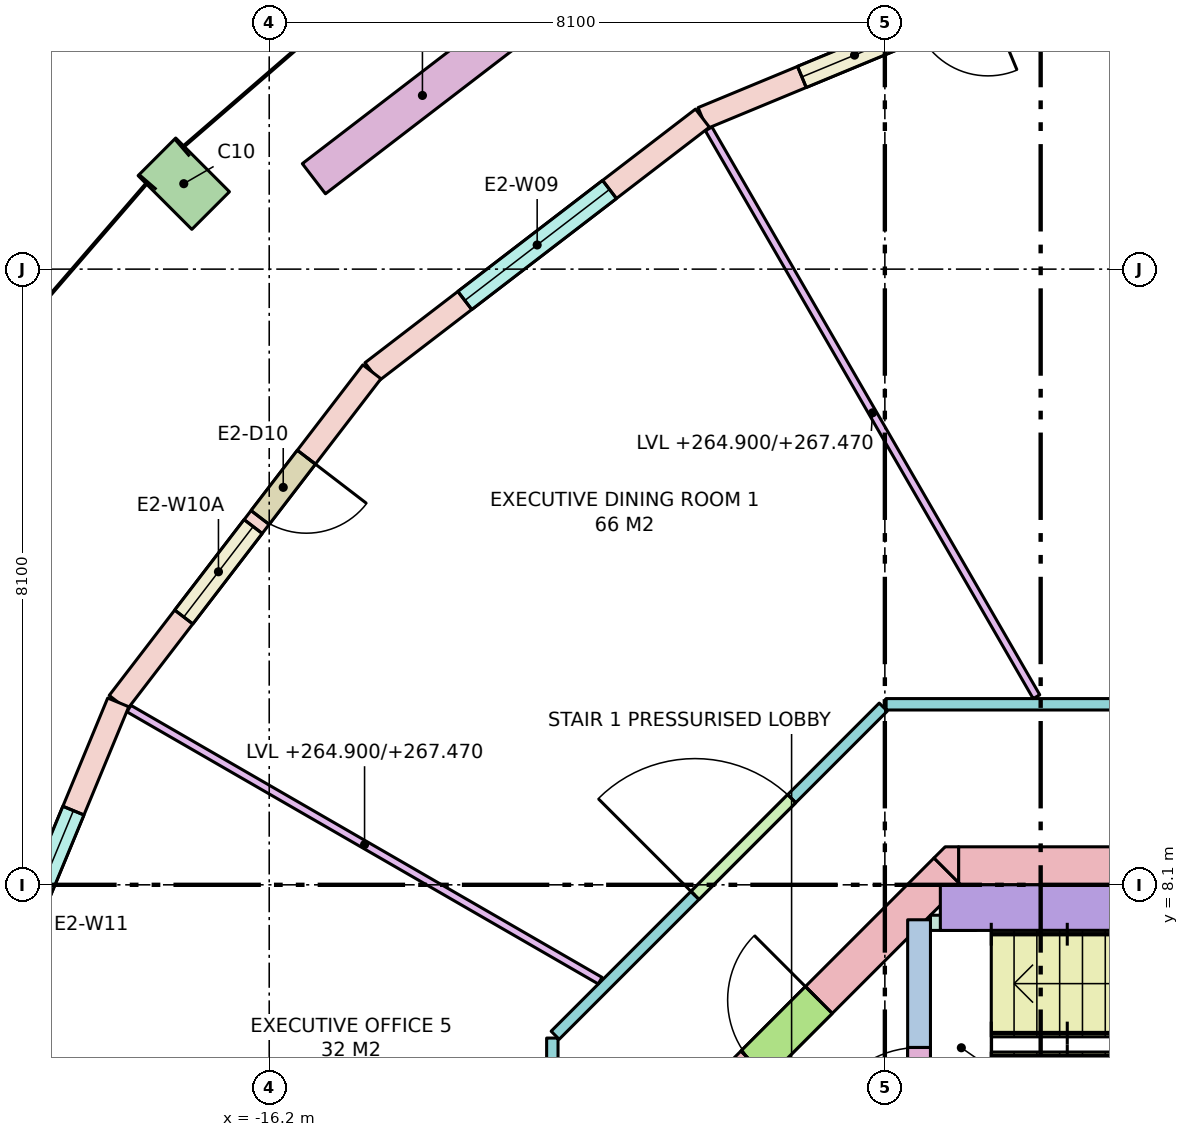
"""IFC4 building model, lengths in metres.
Left out: names, types, materials, properties, quantities, classifications, styles, units other than length and angle.
Written with IfcOpenShell. Run it as: python <this file> out.ifc"""

import sys

from ifc_helpers import new_model, si_unit, direction, frame, frame_2d, origin, origin_2d, place, context, subcontext, project, spatial, polyline, rectangle, outline, extrude, element, fill, save


model = new_model("IFC4")
c1 = context("Model", 3, precision=1e-05, world=origin(), true_north=direction((0.0, 1.0)))
c2 = subcontext(c1, "Body", "Model", "MODEL_VIEW")
j1 = project(units=[si_unit("LENGTHUNIT", "METRE"), si_unit("PLANEANGLEUNIT", "RADIAN")], contexts=[c1])
p1 = place(None, origin())
s1 = spatial("IfcSite", under=j1, at=p1, CompositionType="ELEMENT")
p2 = place(p1, origin())
s2 = spatial("IfcBuilding", under=s1, at=p2, CompositionType="ELEMENT")
p3 = place(p2, frame((0.0, 0.0, 264.9)))
s3 = spatial("IfcBuildingStorey", under=s2, at=p3, CompositionType="ELEMENT", Elevation=264.9)
p4 = place(p3, frame((-17.324, 17.324, 0.0), z_axis=(0.0, 0.0, 1.0), x_axis=(-0.707106781187, -0.707106781187, 0.0)))
e1 = element("IfcColumn", 1, at=p4, inside=s3, PredefinedType="COLUMN", context=c2, shape_type="SweptSolid", body=[
    extrude(rectangle(XDim=0.7, YDim=1.0, at=origin_2d()), origin(), (0.0, 0.0, 1.0), 3.7),
])
p5 = place(p3, frame((-7.13, 8.35, -0.28), z_axis=(0.0, 0.0, 1.0), x_axis=(1.0, 0.0, 0.0)))
e2 = element("IfcWall", 2, at=p5, inside=s3, PredefinedType="SHEAR", context=c2, shape_type="SweptSolid", body=[
    extrude(rectangle(XDim=14.26, YDim=0.5, at=frame_2d((7.13, 0.0))), origin(), (0.0, 0.0, 1.0), 3.7),
])
p6 = place(p5, frame((5.48, 0.0, 0.28)))
e3 = element("IfcOpeningElement", 3, at=p6, cuts=e2, PredefinedType="OPENING", context=c2, shape_type="SweptSolid", body=[
    extrude(rectangle(XDim=0.7, YDim=2.1, at=frame_2d((0.35, 1.05))), frame((0.0, 0.26, 0.0), z_axis=(0.0, -1.0, 0.0), x_axis=(1.0, 0.0, 0.0)), (0.0, 0.0, 1.0), 0.52),
])
p7 = place(p5, frame((7.155, 0.0, 0.28)))
e4 = element("IfcOpeningElement", 4, at=p7, cuts=e2, PredefinedType="OPENING", context=c2, shape_type="SweptSolid", body=[
    extrude(rectangle(XDim=0.9, YDim=2.1, at=frame_2d((0.45, 1.05))), frame((0.0, 0.26, 0.0), z_axis=(0.0, -1.0, 0.0), x_axis=(1.0, 0.0, 0.0)), (0.0, 0.0, 1.0), 0.52),
])
p8 = place(p3, frame((-10.277, 5.277, -0.28), z_axis=(0.0, 0.0, 1.0), x_axis=(0.707106781187, 0.707106781187, 0.0)))
e5 = element("IfcWall", 5, at=p8, inside=s3, PredefinedType="SHEAR", context=c2, shape_type="SweptSolid", body=[
    extrude(rectangle(XDim=4.243, YDim=0.5, at=frame_2d((2.121, 0.0))), origin(), (0.0, 0.0, 1.0), 3.7),
])
p9 = place(p8, frame((0.65, 0.0, 0.28)))
e6 = element("IfcOpeningElement", 6, at=p9, cuts=e5, PredefinedType="OPENING", context=c2, shape_type="SweptSolid", body=[
    extrude(rectangle(XDim=1.2, YDim=2.1, at=frame_2d((0.6, 1.05))), frame((0.0, 0.26, 0.0), z_axis=(0.0, -1.0, 0.0), x_axis=(1.0, 0.0, 0.0)), (0.0, 0.0, 1.0), 0.52),
])
p10 = place(p3, frame((0.0, 0.0, -0.28)))
e7 = element("IfcWall", 7, at=p10, inside=s3, PredefinedType="SHEAR", context=c2, shape_type="SweptSolid", body=[
    extrude(outline(polyline([(-7.307, 8.6), (-7.13, 8.6), (-7.13, 8.13), (-7.454, 8.454), (-7.307, 8.6)])), origin(), (0.0, 0.0, 1.0), 3.7),
])
p11 = place(p3, frame((-7.65, 4.5, 0.0), z_axis=(0.0, 0.0, 1.0), x_axis=(0.0, 1.0, 0.0)))
e8 = element("IfcWall", 8, at=p11, inside=s3, PredefinedType="SHEAR", context=c2, shape_type="SweptSolid", body=[
    extrude(rectangle(XDim=3.14, YDim=0.3, at=frame_2d((1.57, 0.0))), origin(), (0.0, 0.0, 1.0), 3.42),
])
p12 = place(p11, frame((0.14, 0.0, 0.0)))
e9 = element("IfcOpeningElement", 9, at=p12, cuts=e8, PredefinedType="OPENING", context=c2, shape_type="SweptSolid", body=[
    extrude(rectangle(XDim=1.32, YDim=2.1, at=frame_2d((0.66, 1.05))), frame((0.0, 0.16, 0.0), z_axis=(0.0, -1.0, 0.0), x_axis=(1.0, 0.0, 0.0)), (0.0, 0.0, 1.0), 0.32),
])
p13 = place(p3, frame((-7.37, 7.8, 0.0), z_axis=(0.0, 0.0, 1.0), x_axis=(1.0, 0.0, 0.0)))
e10 = element("IfcWall", 10, at=p13, inside=s3, PredefinedType="SHEAR", context=c2, shape_type="SweptSolid", body=[
    extrude(rectangle(XDim=5.37, YDim=0.6, at=frame_2d((2.685, 0.0))), origin(), (0.0, 0.0, 1.0), 3.42),
])
p14 = place(p3, frame((-7.5, 7.6, 0.0), z_axis=(0.0, 0.0, 1.0), x_axis=(1.0, 0.0, 0.0)))
e11 = element("IfcWall", 11, at=p14, inside=s3, PredefinedType="SHEAR", context=c2, shape_type="SweptSolid", body=[
    extrude(rectangle(XDim=0.6, YDim=0.2, at=frame_2d((0.3, 0.0))), origin(), (0.0, 0.0, 1.0), 3.42),
])
p15 = place(p3, frame((-5.435, 20.284, 0.0), z_axis=(0.0, 0.0, 1.0), x_axis=(-0.923877333662, -0.382688740813, 0.0)))
e12 = element("IfcWall", 12, at=p15, inside=s3, PredefinedType="STANDARD", context=c2, shape_type="SweptSolid", body=[
    extrude(rectangle(XDim=5.482, YDim=0.3, at=frame_2d((2.741, 0.0))), origin(), (0.0, 0.0, 1.0), 3.42),
])
p16 = place(p15, frame((1.416, 0.0, 0.0)))
e13 = element("IfcOpeningElement", 13, at=p16, cuts=e12, PredefinedType="OPENING", context=c2, shape_type="SweptSolid", body=[
    extrude(rectangle(XDim=1.0, YDim=2.4, at=frame_2d((0.5, 1.2))), frame((0.0, 0.16, 0.0), z_axis=(0.0, -1.0, 0.0), x_axis=(1.0, 0.0, 0.0)), (0.0, 0.0, 1.0), 0.32),
])
p17 = place(p15, frame((2.566, 0.0, 0.8)))
e14 = element("IfcOpeningElement", 14, at=p17, cuts=e12, PredefinedType="OPENING", context=c2, shape_type="SweptSolid", body=[
    extrude(rectangle(XDim=1.5, YDim=2.4, at=frame_2d((0.75, 1.2))), frame((0.0, 0.16, 0.0), z_axis=(0.0, -1.0, 0.0), x_axis=(1.0, 0.0, 0.0)), (0.0, 0.0, 1.0), 0.32),
])
p18 = place(p3, frame((-10.5, 18.187, 0.0), z_axis=(0.0, 0.0, 1.0), x_axis=(-0.793335336593, -0.608784891166, 0.0)))
e15 = element("IfcWall", 15, at=p18, inside=s3, PredefinedType="STANDARD", context=c2, shape_type="SweptSolid", body=[
    extrude(rectangle(XDim=5.482, YDim=0.3, at=frame_2d((2.741, 0.0))), origin(), (0.0, 0.0, 1.0), 3.42),
])
p19 = place(p18, frame((1.541, 0.0, 0.8)))
e16 = element("IfcOpeningElement", 16, at=p19, cuts=e15, PredefinedType="OPENING", context=c2, shape_type="SweptSolid", body=[
    extrude(rectangle(XDim=2.4, YDim=2.4, at=frame_2d((1.2, 1.2))), frame((0.0, 0.16, 0.0), z_axis=(0.0, -1.0, 0.0), x_axis=(1.0, 0.0, 0.0)), (0.0, 0.0, 1.0), 0.32),
])
p20 = place(p3, frame((-14.849, 14.849, 0.0), z_axis=(0.0, 0.0, 1.0), x_axis=(-0.608784891166, -0.793335336593, 0.0)))
e17 = element("IfcWall", 17, at=p20, inside=s3, PredefinedType="STANDARD", context=c2, shape_type="SweptSolid", body=[
    extrude(rectangle(XDim=5.482, YDim=0.3, at=frame_2d((2.741, 0.0))), origin(), (0.0, 0.0, 1.0), 3.42),
])
p21 = place(p20, frame((1.416, 0.0, 0.0)))
e18 = element("IfcOpeningElement", 18, at=p21, cuts=e17, PredefinedType="OPENING", context=c2, shape_type="SweptSolid", body=[
    extrude(rectangle(XDim=1.0, YDim=2.4, at=frame_2d((0.5, 1.2))), frame((0.0, 0.16, 0.0), z_axis=(0.0, -1.0, 0.0), x_axis=(1.0, 0.0, 0.0)), (0.0, 0.0, 1.0), 0.32),
])
p22 = place(p20, frame((2.566, 0.0, 0.8)))
e19 = element("IfcOpeningElement", 19, at=p22, cuts=e17, PredefinedType="OPENING", context=c2, shape_type="SweptSolid", body=[
    extrude(rectangle(XDim=1.5, YDim=2.4, at=frame_2d((0.75, 1.2))), frame((0.0, 0.16, 0.0), z_axis=(0.0, -1.0, 0.0), x_axis=(1.0, 0.0, 0.0)), (0.0, 0.0, 1.0), 0.32),
])
p23 = place(p3, frame((-18.187, 10.5, 0.0), z_axis=(0.0, 0.0, 1.0), x_axis=(-0.382688740813, -0.923877333662, 0.0)))
e20 = element("IfcWall", 20, at=p23, inside=s3, PredefinedType="STANDARD", context=c2, shape_type="SweptSolid", body=[
    extrude(rectangle(XDim=5.482, YDim=0.3, at=frame_2d((2.741, 0.0))), origin(), (0.0, 0.0, 1.0), 3.42),
])
p24 = place(p23, frame((1.541, 0.0, 0.8)))
e21 = element("IfcOpeningElement", 21, at=p24, cuts=e20, PredefinedType="OPENING", context=c2, shape_type="SweptSolid", body=[
    extrude(rectangle(XDim=2.4, YDim=2.4, at=frame_2d((1.2, 1.2))), frame((0.0, 0.16, 0.0), z_axis=(0.0, -1.0, 0.0), x_axis=(1.0, 0.0, 0.0)), (0.0, 0.0, 1.0), 0.32),
])
p25 = place(p3, frame((-12.756, 19.581, 0.0), z_axis=(0.0, 0.0, 1.0), x_axis=(-0.793384730612, -0.608720518162, 0.0)))
e22 = element("IfcWall", 22, at=p25, inside=s3, PredefinedType="PARAPET", context=c2, shape_type="SweptSolid", body=[
    extrude(rectangle(XDim=3.6, YDim=0.5, at=frame_2d((1.8, 0.0))), origin(), (0.0, 0.0, 1.0), 0.9),
])
p26 = place(p3, frame((-12.475, -6.084, 0.0), z_axis=(0.0, 0.0, 1.0), x_axis=(0.0, 1.0, 0.0)))
e23 = element("IfcWall", 23, at=p26, inside=s3, PredefinedType="PARTITIONING", context=c2, shape_type="SweptSolid", body=[
    extrude(rectangle(XDim=12.167, YDim=0.15, at=frame_2d((6.084, 0.0))), origin(), (0.0, 0.0, 1.0), 2.57),
])
p27 = place(p26, frame((10.272, 0.0, 0.0)))
e24 = element("IfcOpeningElement", 24, at=p27, cuts=e23, PredefinedType="OPENING", context=c2, shape_type="SweptSolid", body=[
    extrude(rectangle(XDim=1.0, YDim=2.1, at=frame_2d((0.5, 1.05))), frame((0.0, 0.085, 0.0), z_axis=(0.0, -1.0, 0.0), x_axis=(1.0, 0.0, 0.0)), (0.0, 0.0, 1.0), 0.17),
])
p28 = place(p26, frame((7.306, 0.0, 0.0)))
e25 = element("IfcOpeningElement", 25, at=p28, cuts=e23, PredefinedType="OPENING", context=c2, shape_type="SweptSolid", body=[
    extrude(rectangle(XDim=0.9, YDim=2.1, at=frame_2d((0.45, 1.05))), frame((0.0, 0.085, 0.0), z_axis=(0.0, -1.0, 0.0), x_axis=(1.0, 0.0, 0.0)), (0.0, 0.0, 1.0), 0.17),
])
p29 = place(p26, frame((3.961, 0.0, 0.0)))
e26 = element("IfcOpeningElement", 26, at=p29, cuts=e23, PredefinedType="OPENING", context=c2, shape_type="SweptSolid", body=[
    extrude(rectangle(XDim=0.9, YDim=2.1, at=frame_2d((0.45, 1.05))), frame((0.0, 0.085, 0.0), z_axis=(0.0, -1.0, 0.0), x_axis=(1.0, 0.0, 0.0)), (0.0, 0.0, 1.0), 0.17),
])
p30 = place(p26, frame((0.896, 0.0, 0.0)))
e27 = element("IfcOpeningElement", 27, at=p30, cuts=e23, PredefinedType="OPENING", context=c2, shape_type="SweptSolid", body=[
    extrude(rectangle(XDim=1.0, YDim=2.1, at=frame_2d((0.5, 1.05))), frame((0.0, 0.085, 0.0), z_axis=(0.0, -1.0, 0.0), x_axis=(1.0, 0.0, 0.0)), (0.0, 0.0, 1.0), 0.17),
])
p31 = place(p3, frame((-12.438, 6.121, 0.0), z_axis=(0.0, 0.0, 1.0), x_axis=(0.707106781187, 0.707106781187, 0.0)))
e28 = element("IfcWall", 28, at=p31, inside=s3, PredefinedType="PARTITIONING", context=c2, shape_type="SweptSolid", body=[
    extrude(rectangle(XDim=6.105, YDim=0.15, at=frame_2d((3.053, 0.0))), origin(), (0.0, 0.0, 1.0), 2.57),
])
p32 = place(p31, frame((2.602, 0.0, 0.0)))
e29 = element("IfcOpeningElement", 29, at=p32, cuts=e28, PredefinedType="OPENING", context=c2, shape_type="SweptSolid", body=[
    extrude(rectangle(XDim=1.8, YDim=2.1, at=frame_2d((0.9, 1.05))), frame((0.0, 0.085, 0.0), z_axis=(0.0, -1.0, 0.0), x_axis=(1.0, 0.0, 0.0)), (0.0, 0.0, 1.0), 0.17),
])
p33 = place(p3, frame((-8.084, 10.475, 0.0), z_axis=(0.0, 0.0, 1.0), x_axis=(1.0, 0.0, 0.0)))
e30 = element("IfcWall", 30, at=p33, inside=s3, PredefinedType="PARTITIONING", context=c2, shape_type="SweptSolid", body=[
    extrude(rectangle(XDim=16.167, YDim=0.15, at=frame_2d((8.084, 0.0))), origin(), (0.0, 0.0, 1.0), 2.57),
])
p34 = place(p33, frame((13.004, 0.0, 0.0)))
e31 = element("IfcOpeningElement", 31, at=p34, cuts=e30, PredefinedType="OPENING", context=c2, shape_type="SweptSolid", body=[
    extrude(rectangle(XDim=1.0, YDim=2.1, at=frame_2d((0.5, 1.05))), frame((0.0, 0.085, 0.0), z_axis=(0.0, -1.0, 0.0), x_axis=(1.0, 0.0, 0.0)), (0.0, 0.0, 1.0), 0.17),
])
p35 = place(p33, frame((9.038, 0.0, 0.0)))
e32 = element("IfcOpeningElement", 32, at=p35, cuts=e30, PredefinedType="OPENING", context=c2, shape_type="SweptSolid", body=[
    extrude(rectangle(XDim=0.9, YDim=2.1, at=frame_2d((0.45, 1.05))), frame((0.0, 0.085, 0.0), z_axis=(0.0, -1.0, 0.0), x_axis=(1.0, 0.0, 0.0)), (0.0, 0.0, 1.0), 0.17),
])
p36 = place(p33, frame((4.556, 0.0, 0.0)))
e33 = element("IfcOpeningElement", 33, at=p36, cuts=e30, PredefinedType="OPENING", context=c2, shape_type="SweptSolid", body=[
    extrude(rectangle(XDim=1.0, YDim=2.1, at=frame_2d((0.5, 1.05))), frame((0.0, 0.085, 0.0), z_axis=(0.0, -1.0, 0.0), x_axis=(1.0, 0.0, 0.0)), (0.0, 0.0, 1.0), 0.17),
])
p37 = place(p3, frame((-6.105, 10.575, 0.0), z_axis=(0.0, 0.0, 1.0), x_axis=(-0.50001399067, 0.866017326117, 0.0)))
e34 = element("IfcWall", 34, at=p37, inside=s3, PredefinedType="PARTITIONING", context=c2, shape_type="SweptSolid", body=[
    extrude(rectangle(XDim=8.626, YDim=0.1, at=frame_2d((4.313, 0.0))), origin(), (0.0, 0.0, 1.0), 2.57),
])
p38 = place(p3, frame((-11.846, 6.839, 0.0), z_axis=(0.0, 0.0, 1.0), x_axis=(-0.866011787705, 0.500023583, 0.0)))
e35 = element("IfcWall", 35, at=p38, inside=s3, PredefinedType="PARTITIONING", context=c2, shape_type="SweptSolid", body=[
    extrude(rectangle(XDim=7.158, YDim=0.1, at=frame_2d((3.579, 0.0))), origin(), (0.0, 0.0, 1.0), 2.57),
])
p39 = place(p17, origin())
e36 = element("IfcWindow", 36, at=p39, inside=s3, PartitioningType="SINGLE_PANEL", PredefinedType="WINDOW", context=c2, shape_type="SweptSolid", body=[
    extrude(rectangle(XDim=1.5, YDim=2.4, at=frame_2d((0.75, 1.2))), frame((0.0, 0.03, 0.0), z_axis=(0.0, -1.0, 0.0), x_axis=(1.0, 0.0, 0.0)), (0.0, 0.0, 1.0), 0.06),
])
fill(e14, e36)
p40 = place(p19, origin())
e37 = element("IfcWindow", 37, at=p40, inside=s3, PartitioningType="SINGLE_PANEL", PredefinedType="WINDOW", context=c2, shape_type="SweptSolid", body=[
    extrude(rectangle(XDim=2.4, YDim=2.4, at=frame_2d((1.2, 1.2))), frame((0.0, 0.03, 0.0), z_axis=(0.0, -1.0, 0.0), x_axis=(1.0, 0.0, 0.0)), (0.0, 0.0, 1.0), 0.06),
])
fill(e16, e37)
p41 = place(p21, origin())
e38 = element("IfcDoor", 38, at=p41, inside=s3, OperationType="SINGLE_SWING_LEFT", PredefinedType="DOOR", context=c2, shape_type="SweptSolid", body=[
    extrude(rectangle(XDim=1.0, YDim=2.4, at=frame_2d((0.5, 1.2))), frame((0.0, 0.025, 0.0), z_axis=(0.0, -1.0, 0.0), x_axis=(1.0, 0.0, 0.0)), (0.0, 0.0, 1.0), 0.05),
])
fill(e18, e38)
p42 = place(p22, origin())
e39 = element("IfcWindow", 39, at=p42, inside=s3, PartitioningType="SINGLE_PANEL", PredefinedType="WINDOW", context=c2, shape_type="SweptSolid", body=[
    extrude(rectangle(XDim=1.5, YDim=2.4, at=frame_2d((0.75, 1.2))), frame((0.0, 0.03, 0.0), z_axis=(0.0, -1.0, 0.0), x_axis=(1.0, 0.0, 0.0)), (0.0, 0.0, 1.0), 0.06),
])
fill(e19, e39)
p43 = place(p24, origin())
e40 = element("IfcWindow", 40, at=p43, inside=s3, PartitioningType="SINGLE_PANEL", PredefinedType="WINDOW", context=c2, shape_type="SweptSolid", body=[
    extrude(rectangle(XDim=2.4, YDim=2.4, at=frame_2d((1.2, 1.2))), frame((0.0, 0.03, 0.0), z_axis=(0.0, -1.0, 0.0), x_axis=(1.0, 0.0, 0.0)), (0.0, 0.0, 1.0), 0.06),
])
fill(e21, e40)
p44 = place(p12, origin())
e41 = element("IfcDoor", 41, at=p44, inside=s3, OperationType="DOUBLE_DOOR_SINGLE_SWING", PredefinedType="DOOR", context=c2, shape_type="SweptSolid", body=[
    extrude(rectangle(XDim=1.32, YDim=2.1, at=frame_2d((0.66, 1.05))), frame((0.0, 0.025, 0.0), z_axis=(0.0, -1.0, 0.0), x_axis=(1.0, 0.0, 0.0)), (0.0, 0.0, 1.0), 0.05),
])
fill(e9, e41)
p45 = place(p9, origin())
e42 = element("IfcDoor", 42, at=p45, inside=s3, OperationType="SINGLE_SWING_RIGHT", PredefinedType="DOOR", context=c2, shape_type="SweptSolid", body=[
    extrude(rectangle(XDim=1.2, YDim=2.1, at=frame_2d((0.6, 1.05))), frame((0.0, 0.025, 0.0), z_axis=(0.0, -1.0, 0.0), x_axis=(1.0, 0.0, 0.0)), (0.0, 0.0, 1.0), 0.05),
])
fill(e6, e42)
p46 = place(p32, origin())
e43 = element("IfcDoor", 43, at=p46, inside=s3, OperationType="DOUBLE_DOOR_SINGLE_SWING", PredefinedType="DOOR", context=c2, shape_type="SweptSolid", body=[
    extrude(rectangle(XDim=1.8, YDim=2.1, at=frame_2d((0.9, 1.05))), frame((0.0, 0.025, 0.0), z_axis=(0.0, -1.0, 0.0), x_axis=(1.0, 0.0, 0.0)), (0.0, 0.0, 1.0), 0.05),
])
fill(e29, e43)
save(model, sys.argv[1])
